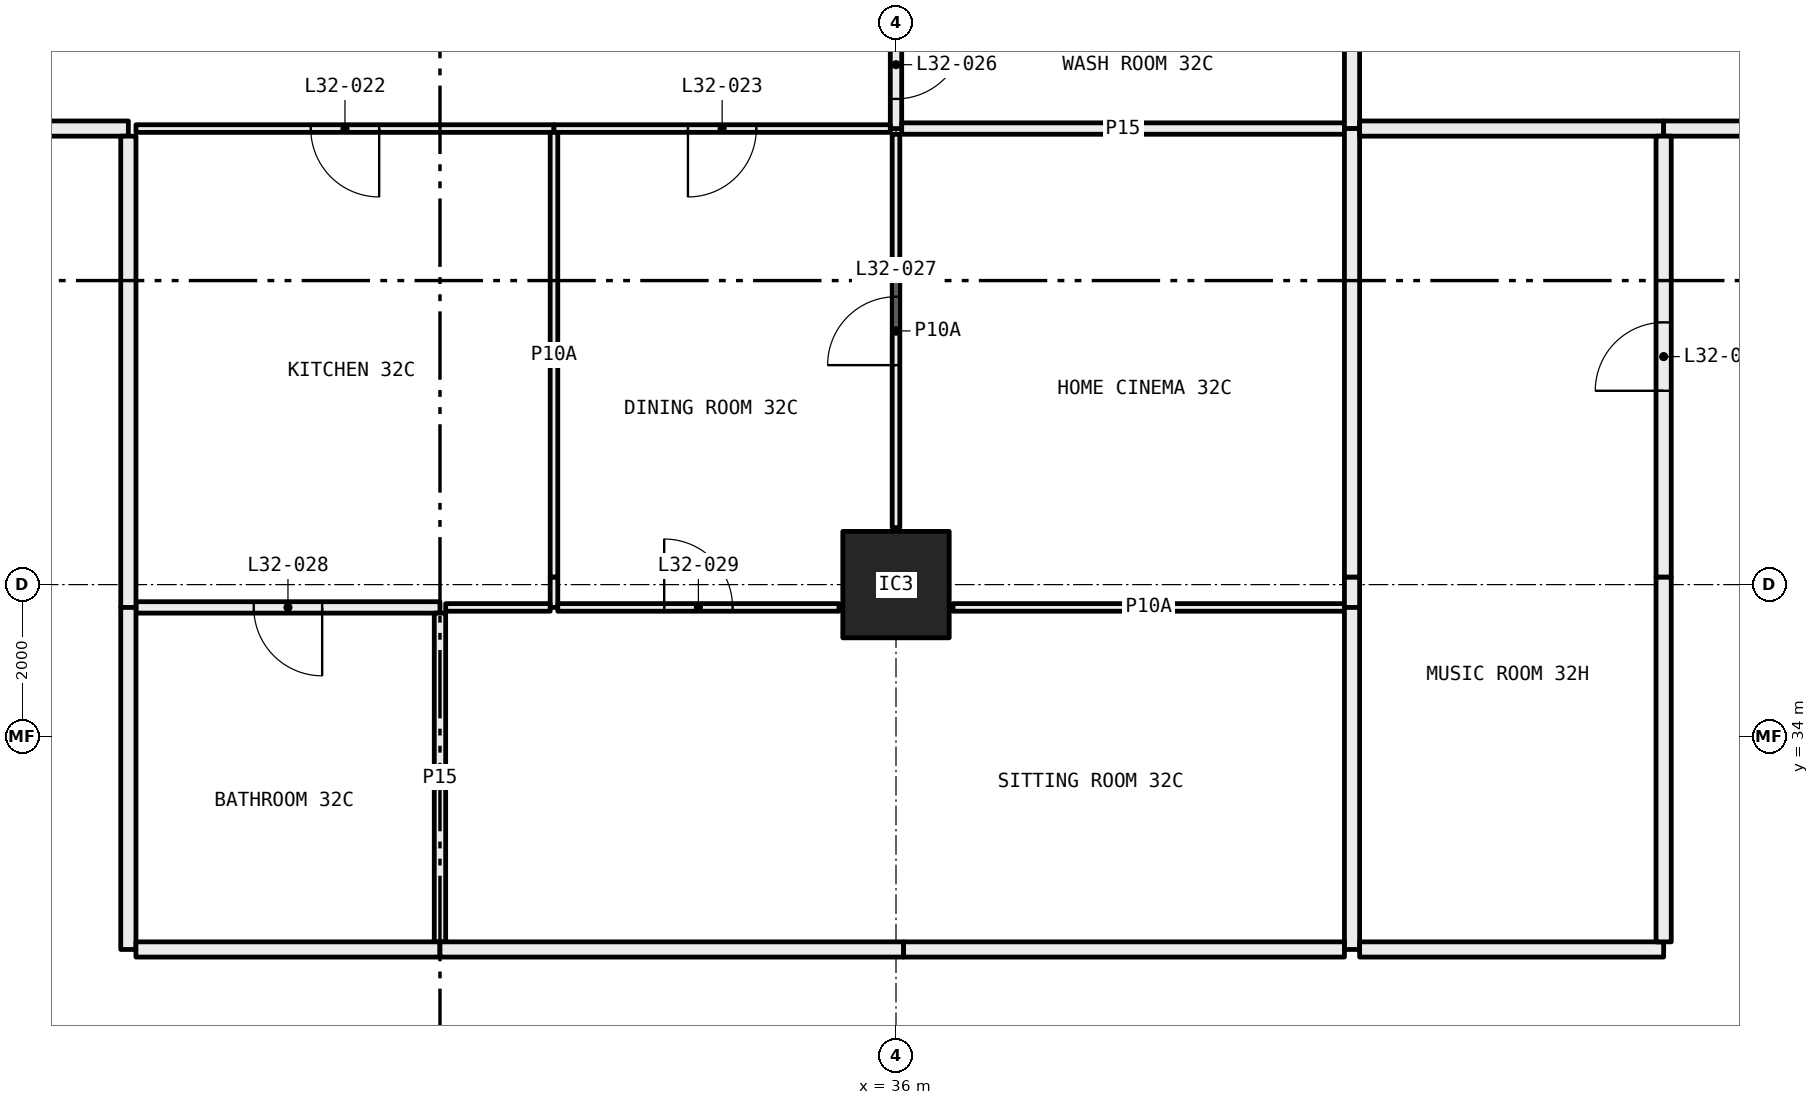
"""IFC4 building model, lengths in metres.
Left out: names, types, materials, properties, quantities, classifications, styles, units other than length and angle.
Written with IfcOpenShell. Run it as: python <this file> out.ifc"""

import sys

from ifc_helpers import new_model, si_unit, direction, frame, frame_2d, origin, origin_2d, place, context, subcontext, project, spatial, rectangle, hollow_rectangle, extrude, element, fill, save


model = new_model("IFC4")
c1 = context("Model", 3, precision=1e-05, world=origin(), true_north=direction((0.0, 1.0)))
c2 = subcontext(c1, "Body", "Model", "MODEL_VIEW")
j1 = project(units=[si_unit("LENGTHUNIT", "METRE"), si_unit("PLANEANGLEUNIT", "RADIAN")], contexts=[c1])
p1 = place(None, origin())
s1 = spatial("IfcSite", under=j1, at=p1, CompositionType="ELEMENT")
p2 = place(p1, origin())
s2 = spatial("IfcBuilding", under=s1, at=p2, CompositionType="ELEMENT")
p3 = place(p2, frame((0.0, 0.0, 124.2)))
s3 = spatial("IfcBuildingStorey", under=s2, at=p3, CompositionType="ELEMENT", Elevation=124.2)
p4 = place(p3, frame((36.0, 36.0, 0.0), z_axis=(0.0, 0.0, 1.0), x_axis=(1.0, 0.0, 0.0)))
e1 = element("IfcColumn", 1, at=p4, inside=s3, PredefinedType="COLUMN", context=c2, shape_type="SweptSolid", body=[
    extrude(hollow_rectangle(XDim=1.4, YDim=1.4, WallThickness=0.06, at=origin_2d()), origin(), (0.0, 0.0, 1.0), 3.05),
])
p5 = place(p3, frame((36.0, 42.0, 0.0), z_axis=(0.0, 0.0, 1.0), x_axis=(0.0, 1.0, 0.0)))
e2 = element("IfcWall", 2, at=p5, inside=s3, PredefinedType="PARTITIONING", context=c2, shape_type="SweptSolid", body=[
    extrude(rectangle(XDim=1.68, YDim=0.15, at=frame_2d((0.84, 0.0))), origin(), (0.0, 0.0, 1.0), 2.45),
])
p6 = place(p5, frame((0.39, 0.0, 0.0)))
e3 = element("IfcOpeningElement", 3, at=p6, cuts=e2, PredefinedType="OPENING", context=c2, shape_type="SweptSolid", body=[
    extrude(rectangle(XDim=0.9, YDim=2.1, at=frame_2d((0.45, 1.05))), frame((0.0, 0.085, 0.0), z_axis=(0.0, -1.0, 0.0), x_axis=(1.0, 0.0, 0.0)), (0.0, 0.0, 1.0), 0.17),
])
p7 = place(p3, frame((26.0, 42.0, 0.0), z_axis=(0.0, 0.0, 1.0), x_axis=(1.0, 0.0, 0.0)))
e4 = element("IfcWall", 4, at=p7, inside=s3, PredefinedType="PARTITIONING", context=c2, shape_type="SweptSolid", body=[
    extrude(rectangle(XDim=5.5, YDim=0.1, at=frame_2d((2.75, 0.0))), origin(), (0.0, 0.0, 1.0), 3.05),
])
p8 = place(p7, frame((2.3, 0.0, 0.0)))
e5 = element("IfcOpeningElement", 5, at=p8, cuts=e4, PredefinedType="OPENING", context=c2, shape_type="SweptSolid", body=[
    extrude(rectangle(XDim=0.9, YDim=2.1, at=frame_2d((0.45, 1.05))), frame((0.0, 0.06, 0.0), z_axis=(0.0, -1.0, 0.0), x_axis=(1.0, 0.0, 0.0)), (0.0, 0.0, 1.0), 0.12),
])
p9 = place(p3, frame((31.5, 42.0, 0.0), z_axis=(0.0, 0.0, 1.0), x_axis=(1.0, 0.0, 0.0)))
e6 = element("IfcWall", 6, at=p9, inside=s3, PredefinedType="PARTITIONING", context=c2, shape_type="SweptSolid", body=[
    extrude(rectangle(XDim=4.425, YDim=0.1, at=frame_2d((2.212, 0.0))), origin(), (0.0, 0.0, 1.0), 2.45),
])
p10 = place(p9, frame((1.762, 0.0, 0.0)))
e7 = element("IfcOpeningElement", 7, at=p10, cuts=e6, PredefinedType="OPENING", context=c2, shape_type="SweptSolid", body=[
    extrude(rectangle(XDim=0.9, YDim=2.1, at=frame_2d((0.45, 1.05))), frame((0.0, 0.06, 0.0), z_axis=(0.0, -1.0, 0.0), x_axis=(1.0, 0.0, 0.0)), (0.0, 0.0, 1.0), 0.12),
])
p11 = place(p3, frame((24.0, 42.0, 0.0), z_axis=(0.0, 0.0, 1.0), x_axis=(1.0, 0.0, 0.0)))
e8 = element("IfcWall", 8, at=p11, inside=s3, PredefinedType="PARTITIONING", context=c2, shape_type="SweptSolid", body=[
    extrude(rectangle(XDim=1.9, YDim=0.2, at=frame_2d((0.95, 0.0))), origin(), (0.0, 0.0, 1.0), 3.05),
])
p12 = place(p3, frame((36.075, 42.0, 0.0), z_axis=(0.0, 0.0, 1.0), x_axis=(1.0, 0.0, 0.0)))
e9 = element("IfcWall", 9, at=p12, inside=s3, PredefinedType="PARTITIONING", context=c2, shape_type="SweptSolid", body=[
    extrude(rectangle(XDim=5.825, YDim=0.15, at=frame_2d((2.913, 0.0))), origin(), (0.0, 0.0, 1.0), 2.45),
])
p13 = place(p3, frame((42.0, 42.0, 0.0), z_axis=(0.0, 0.0, 1.0), x_axis=(0.0, 1.0, 0.0)))
e10 = element("IfcWall", 10, at=p13, inside=s3, PredefinedType="PARTITIONING", context=c2, shape_type="SweptSolid", body=[
    extrude(rectangle(XDim=1.68, YDim=0.2, at=frame_2d((0.84, 0.0))), origin(), (0.0, 0.0, 1.0), 3.05),
])
p14 = place(p3, frame((31.5, 35.7, 0.0), z_axis=(0.0, 0.0, 1.0), x_axis=(0.0, 1.0, 0.0)))
e11 = element("IfcWall", 11, at=p14, inside=s3, PredefinedType="PARTITIONING", context=c2, shape_type="SweptSolid", body=[
    extrude(rectangle(XDim=0.4, YDim=0.1, at=frame_2d((0.2, 0.0))), origin(), (0.0, 0.0, 1.0), 2.45),
])
p15 = place(p3, frame((31.5, 36.1, 0.0), z_axis=(0.0, 0.0, 1.0), x_axis=(0.0, 1.0, 0.0)))
e12 = element("IfcWall", 12, at=p15, inside=s3, PredefinedType="PARTITIONING", context=c2, shape_type="SweptSolid", body=[
    extrude(rectangle(XDim=5.85, YDim=0.1, at=frame_2d((2.925, 0.0))), origin(), (0.0, 0.0, 1.0), 3.05),
])
p16 = place(p3, frame((26.0, 35.7, 0.0), z_axis=(0.0, 0.0, 1.0), x_axis=(1.0, 0.0, 0.0)))
e13 = element("IfcWall", 13, at=p16, inside=s3, PredefinedType="PARTITIONING", context=c2, shape_type="SweptSolid", body=[
    extrude(rectangle(XDim=4.0, YDim=0.15, at=frame_2d((2.0, 0.0))), origin(), (0.0, 0.0, 1.0), 3.05),
])
p17 = place(p16, frame((1.55, 0.0, 0.0)))
e14 = element("IfcOpeningElement", 14, at=p17, cuts=e13, PredefinedType="OPENING", context=c2, shape_type="SweptSolid", body=[
    extrude(rectangle(XDim=0.9, YDim=2.1, at=frame_2d((0.45, 1.05))), frame((0.0, 0.085, 0.0), z_axis=(0.0, -1.0, 0.0), x_axis=(1.0, 0.0, 0.0)), (0.0, 0.0, 1.0), 0.17),
])
p18 = place(p3, frame((30.075, 35.7, 0.0), z_axis=(0.0, 0.0, 1.0), x_axis=(1.0, 0.0, 0.0)))
e15 = element("IfcWall", 15, at=p18, inside=s3, PredefinedType="PARTITIONING", context=c2, shape_type="SweptSolid", body=[
    extrude(rectangle(XDim=1.375, YDim=0.1, at=frame_2d((0.688, 0.0))), origin(), (0.0, 0.0, 1.0), 3.05),
])
p19 = place(p3, frame((25.9, 41.9, 0.0), z_axis=(0.0, 0.0, 1.0), x_axis=(0.0, -1.0, 0.0)))
e16 = element("IfcWall", 16, at=p19, inside=s3, PredefinedType="PARTITIONING", context=c2, shape_type="SweptSolid", body=[
    extrude(rectangle(XDim=6.2, YDim=0.2, at=frame_2d((3.1, 0.0))), origin(), (0.0, 0.0, 1.0), 2.45),
])
p20 = place(p3, frame((36.0, 36.75, 0.0), z_axis=(0.0, 0.0, 1.0), x_axis=(0.0, 1.0, 0.0)))
e17 = element("IfcWall", 17, at=p20, inside=s3, PredefinedType="PARTITIONING", context=c2, shape_type="SweptSolid", body=[
    extrude(rectangle(XDim=5.175, YDim=0.1, at=frame_2d((2.587, 0.0))), origin(), (0.0, 0.0, 1.0), 2.45),
])
p21 = place(p20, frame((2.137, 0.0, 0.0)))
e18 = element("IfcOpeningElement", 18, at=p21, cuts=e17, PredefinedType="OPENING", context=c2, shape_type="SweptSolid", body=[
    extrude(rectangle(XDim=0.9, YDim=2.1, at=frame_2d((0.45, 1.05))), frame((0.0, 0.06, 0.0), z_axis=(0.0, -1.0, 0.0), x_axis=(1.0, 0.0, 0.0)), (0.0, 0.0, 1.0), 0.12),
])
p22 = place(p3, frame((31.55, 35.7, 0.0), z_axis=(0.0, 0.0, 1.0), x_axis=(1.0, 0.0, 0.0)))
e19 = element("IfcWall", 19, at=p22, inside=s3, PredefinedType="PARTITIONING", context=c2, shape_type="SweptSolid", body=[
    extrude(rectangle(XDim=3.7, YDim=0.1, at=frame_2d((1.85, 0.0))), origin(), (0.0, 0.0, 1.0), 3.05),
])
p23 = place(p22, frame((1.4, 0.0, 0.0)))
e20 = element("IfcOpeningElement", 20, at=p23, cuts=e19, PredefinedType="OPENING", context=c2, shape_type="SweptSolid", body=[
    extrude(rectangle(XDim=0.9, YDim=2.1, at=frame_2d((0.45, 1.05))), frame((0.0, 0.06, 0.0), z_axis=(0.0, -1.0, 0.0), x_axis=(1.0, 0.0, 0.0)), (0.0, 0.0, 1.0), 0.12),
])
p24 = place(p3, frame((36.75, 35.7, 0.0), z_axis=(0.0, 0.0, 1.0), x_axis=(1.0, 0.0, 0.0)))
e21 = element("IfcWall", 21, at=p24, inside=s3, PredefinedType="PARTITIONING", context=c2, shape_type="SweptSolid", body=[
    extrude(rectangle(XDim=5.15, YDim=0.1, at=frame_2d((2.575, 0.0))), origin(), (0.0, 0.0, 1.0), 3.05),
])
p25 = place(p3, frame((42.0, 35.7, 0.0), z_axis=(0.0, 0.0, 1.0), x_axis=(0.0, 1.0, 0.0)))
e22 = element("IfcWall", 22, at=p25, inside=s3, PredefinedType="PARTITIONING", context=c2, shape_type="SweptSolid", body=[
    extrude(rectangle(XDim=0.4, YDim=0.2, at=frame_2d((0.2, 0.0))), origin(), (0.0, 0.0, 1.0), 2.45),
])
p26 = place(p3, frame((42.0, 36.1, 0.0), z_axis=(0.0, 0.0, 1.0), x_axis=(0.0, 1.0, 0.0)))
e23 = element("IfcWall", 23, at=p26, inside=s3, PredefinedType="PARTITIONING", context=c2, shape_type="SweptSolid", body=[
    extrude(rectangle(XDim=5.9, YDim=0.2, at=frame_2d((2.95, 0.0))), origin(), (0.0, 0.0, 1.0), 3.05),
])
p27 = place(p3, frame((30.0, 31.3, 0.0), z_axis=(0.0, 0.0, 1.0), x_axis=(0.0, 1.0, 0.0)))
e24 = element("IfcWall", 24, at=p27, inside=s3, PredefinedType="PARTITIONING", context=c2, shape_type="SweptSolid", body=[
    extrude(rectangle(XDim=4.325, YDim=0.15, at=frame_2d((2.163, 0.0))), origin(), (0.0, 0.0, 1.0), 3.05),
])
p28 = place(p3, frame((25.9, 35.7, 0.0), z_axis=(0.0, 0.0, 1.0), x_axis=(0.0, -1.0, 0.0)))
e25 = element("IfcWall", 25, at=p28, inside=s3, PredefinedType="PARTITIONING", context=c2, shape_type="SweptSolid", body=[
    extrude(rectangle(XDim=4.5, YDim=0.2, at=frame_2d((2.25, 0.0))), origin(), (0.0, 0.0, 1.0), 3.05),
])
p29 = place(p3, frame((26.0, 31.2, 0.0), z_axis=(0.0, 0.0, 1.0), x_axis=(1.0, 0.0, 0.0)))
e26 = element("IfcWall", 26, at=p29, inside=s3, PredefinedType="PARTITIONING", context=c2, shape_type="SweptSolid", body=[
    extrude(rectangle(XDim=4.0, YDim=0.2, at=frame_2d((2.0, 0.0))), origin(), (0.0, 0.0, 1.0), 3.05),
])
p30 = place(p3, frame((42.0, 31.2, 0.0), z_axis=(0.0, 0.0, 1.0), x_axis=(0.0, 1.0, 0.0)))
e27 = element("IfcWall", 27, at=p30, inside=s3, PredefinedType="PARTITIONING", context=c2, shape_type="SweptSolid", body=[
    extrude(rectangle(XDim=4.5, YDim=0.2, at=frame_2d((2.25, 0.0))), origin(), (0.0, 0.0, 1.0), 3.05),
])
p31 = place(p3, frame((30.0, 31.2, 0.0), z_axis=(0.0, 0.0, 1.0), x_axis=(1.0, 0.0, 0.0)))
e28 = element("IfcWall", 28, at=p31, inside=s3, PredefinedType="PARTITIONING", context=c2, shape_type="SweptSolid", body=[
    extrude(rectangle(XDim=6.1, YDim=0.2, at=frame_2d((3.05, 0.0))), origin(), (0.0, 0.0, 1.0), 2.45),
])
p32 = place(p3, frame((36.1, 31.2, 0.0), z_axis=(0.0, 0.0, 1.0), x_axis=(1.0, 0.0, 0.0)))
e29 = element("IfcWall", 29, at=p32, inside=s3, PredefinedType="PARTITIONING", context=c2, shape_type="SweptSolid", body=[
    extrude(rectangle(XDim=5.8, YDim=0.2, at=frame_2d((2.9, 0.0))), origin(), (0.0, 0.0, 1.0), 3.05),
])
p33 = place(p3, frame((42.1, 42.0, 0.0), z_axis=(0.0, 0.0, 1.0), x_axis=(1.0, 0.0, 0.0)))
e30 = element("IfcWall", 30, at=p33, inside=s3, PredefinedType="PARTITIONING", context=c2, shape_type="SweptSolid", body=[
    extrude(rectangle(XDim=4.0, YDim=0.2, at=frame_2d((2.0, 0.0))), origin(), (0.0, 0.0, 1.0), 3.05),
])
p34 = place(p3, frame((46.1, 42.0, 0.0), z_axis=(0.0, 0.0, 1.0), x_axis=(1.0, 0.0, 0.0)))
e31 = element("IfcWall", 31, at=p34, inside=s3, PredefinedType="PARTITIONING", context=c2, shape_type="SweptSolid", body=[
    extrude(rectangle(XDim=1.9, YDim=0.2, at=frame_2d((0.95, 0.0))), origin(), (0.0, 0.0, 1.0), 3.05),
])
p35 = place(p3, frame((42.1, 31.2, 0.0), z_axis=(0.0, 0.0, 1.0), x_axis=(1.0, 0.0, 0.0)))
e32 = element("IfcWall", 32, at=p35, inside=s3, PredefinedType="PARTITIONING", context=c2, shape_type="SweptSolid", body=[
    extrude(rectangle(XDim=4.0, YDim=0.2, at=frame_2d((2.0, 0.0))), origin(), (0.0, 0.0, 1.0), 3.05),
])
p36 = place(p3, frame((46.1, 31.3, 0.0), z_axis=(0.0, 0.0, 1.0), x_axis=(0.0, 1.0, 0.0)))
e33 = element("IfcWall", 33, at=p36, inside=s3, PredefinedType="PARTITIONING", context=c2, shape_type="SweptSolid", body=[
    extrude(rectangle(XDim=4.8, YDim=0.2, at=frame_2d((2.4, 0.0))), origin(), (0.0, 0.0, 1.0), 2.45),
])
p37 = place(p3, frame((46.1, 36.1, 0.0), z_axis=(0.0, 0.0, 1.0), x_axis=(0.0, 1.0, 0.0)))
e34 = element("IfcWall", 34, at=p37, inside=s3, PredefinedType="PARTITIONING", context=c2, shape_type="SweptSolid", body=[
    extrude(rectangle(XDim=5.8, YDim=0.2, at=frame_2d((2.9, 0.0))), origin(), (0.0, 0.0, 1.0), 3.05),
])
p38 = place(p37, frame((2.45, 0.0, 0.0)))
e35 = element("IfcOpeningElement", 35, at=p38, cuts=e34, PredefinedType="OPENING", context=c2, shape_type="SweptSolid", body=[
    extrude(rectangle(XDim=0.9, YDim=2.1, at=frame_2d((0.45, 1.05))), frame((0.0, 0.11, 0.0), z_axis=(0.0, -1.0, 0.0), x_axis=(1.0, 0.0, 0.0)), (0.0, 0.0, 1.0), 0.22),
])
p39 = place(p8, frame((0.9, 0.0, 0.0), x_axis=(-1.0, 0.0, 0.0)))
e36 = element("IfcDoor", 36, at=p39, inside=s3, OperationType="SINGLE_SWING_RIGHT", PredefinedType="DOOR", context=c2, shape_type="SweptSolid", body=[
    extrude(rectangle(XDim=0.9, YDim=2.1, at=frame_2d((0.45, 1.05))), frame((0.0, 0.025, 0.0), z_axis=(0.0, -1.0, 0.0), x_axis=(1.0, 0.0, 0.0)), (0.0, 0.0, 1.0), 0.05),
])
fill(e5, e36)
p40 = place(p10, frame((0.9, 0.0, 0.0), x_axis=(-1.0, 0.0, 0.0)))
e37 = element("IfcDoor", 37, at=p40, inside=s3, OperationType="SINGLE_SWING_LEFT", PredefinedType="DOOR", context=c2, shape_type="SweptSolid", body=[
    extrude(rectangle(XDim=0.9, YDim=2.1, at=frame_2d((0.45, 1.05))), frame((0.0, 0.025, 0.0), z_axis=(0.0, -1.0, 0.0), x_axis=(1.0, 0.0, 0.0)), (0.0, 0.0, 1.0), 0.05),
])
fill(e7, e37)
p41 = place(p6, frame((0.9, 0.0, 0.0), x_axis=(-1.0, 0.0, 0.0)))
e38 = element("IfcDoor", 38, at=p41, inside=s3, OperationType="SINGLE_SWING_RIGHT", PredefinedType="DOOR", context=c2, shape_type="SweptSolid", body=[
    extrude(rectangle(XDim=0.9, YDim=2.1, at=frame_2d((0.45, 1.05))), frame((0.0, 0.025, 0.0), z_axis=(0.0, -1.0, 0.0), x_axis=(1.0, 0.0, 0.0)), (0.0, 0.0, 1.0), 0.05),
])
fill(e3, e38)
p42 = place(p21, origin())
e39 = element("IfcDoor", 39, at=p42, inside=s3, OperationType="SINGLE_SWING_RIGHT", PredefinedType="DOOR", context=c2, shape_type="SweptSolid", body=[
    extrude(rectangle(XDim=0.9, YDim=2.1, at=frame_2d((0.45, 1.05))), frame((0.0, 0.025, 0.0), z_axis=(0.0, -1.0, 0.0), x_axis=(1.0, 0.0, 0.0)), (0.0, 0.0, 1.0), 0.05),
])
fill(e18, e39)
p43 = place(p17, frame((0.9, 0.0, 0.0), x_axis=(-1.0, 0.0, 0.0)))
e40 = element("IfcDoor", 40, at=p43, inside=s3, OperationType="SINGLE_SWING_RIGHT", PredefinedType="DOOR", context=c2, shape_type="SweptSolid", body=[
    extrude(rectangle(XDim=0.9, YDim=2.1, at=frame_2d((0.45, 1.05))), frame((0.0, 0.025, 0.0), z_axis=(0.0, -1.0, 0.0), x_axis=(1.0, 0.0, 0.0)), (0.0, 0.0, 1.0), 0.05),
])
fill(e14, e40)
p44 = place(p23, origin())
e41 = element("IfcDoor", 41, at=p44, inside=s3, OperationType="SINGLE_SWING_RIGHT", PredefinedType="DOOR", context=c2, shape_type="SweptSolid", body=[
    extrude(rectangle(XDim=0.9, YDim=2.1, at=frame_2d((0.45, 1.05))), frame((0.0, 0.025, 0.0), z_axis=(0.0, -1.0, 0.0), x_axis=(1.0, 0.0, 0.0)), (0.0, 0.0, 1.0), 0.05),
])
fill(e20, e41)
p45 = place(p38, origin())
e42 = element("IfcDoor", 42, at=p45, inside=s3, OperationType="SINGLE_SWING_RIGHT", PredefinedType="DOOR", context=c2, shape_type="SweptSolid", body=[
    extrude(rectangle(XDim=0.9, YDim=2.1, at=frame_2d((0.45, 1.05))), frame((0.0, 0.025, 0.0), z_axis=(0.0, -1.0, 0.0), x_axis=(1.0, 0.0, 0.0)), (0.0, 0.0, 1.0), 0.05),
])
fill(e35, e42)
save(model, sys.argv[1])
